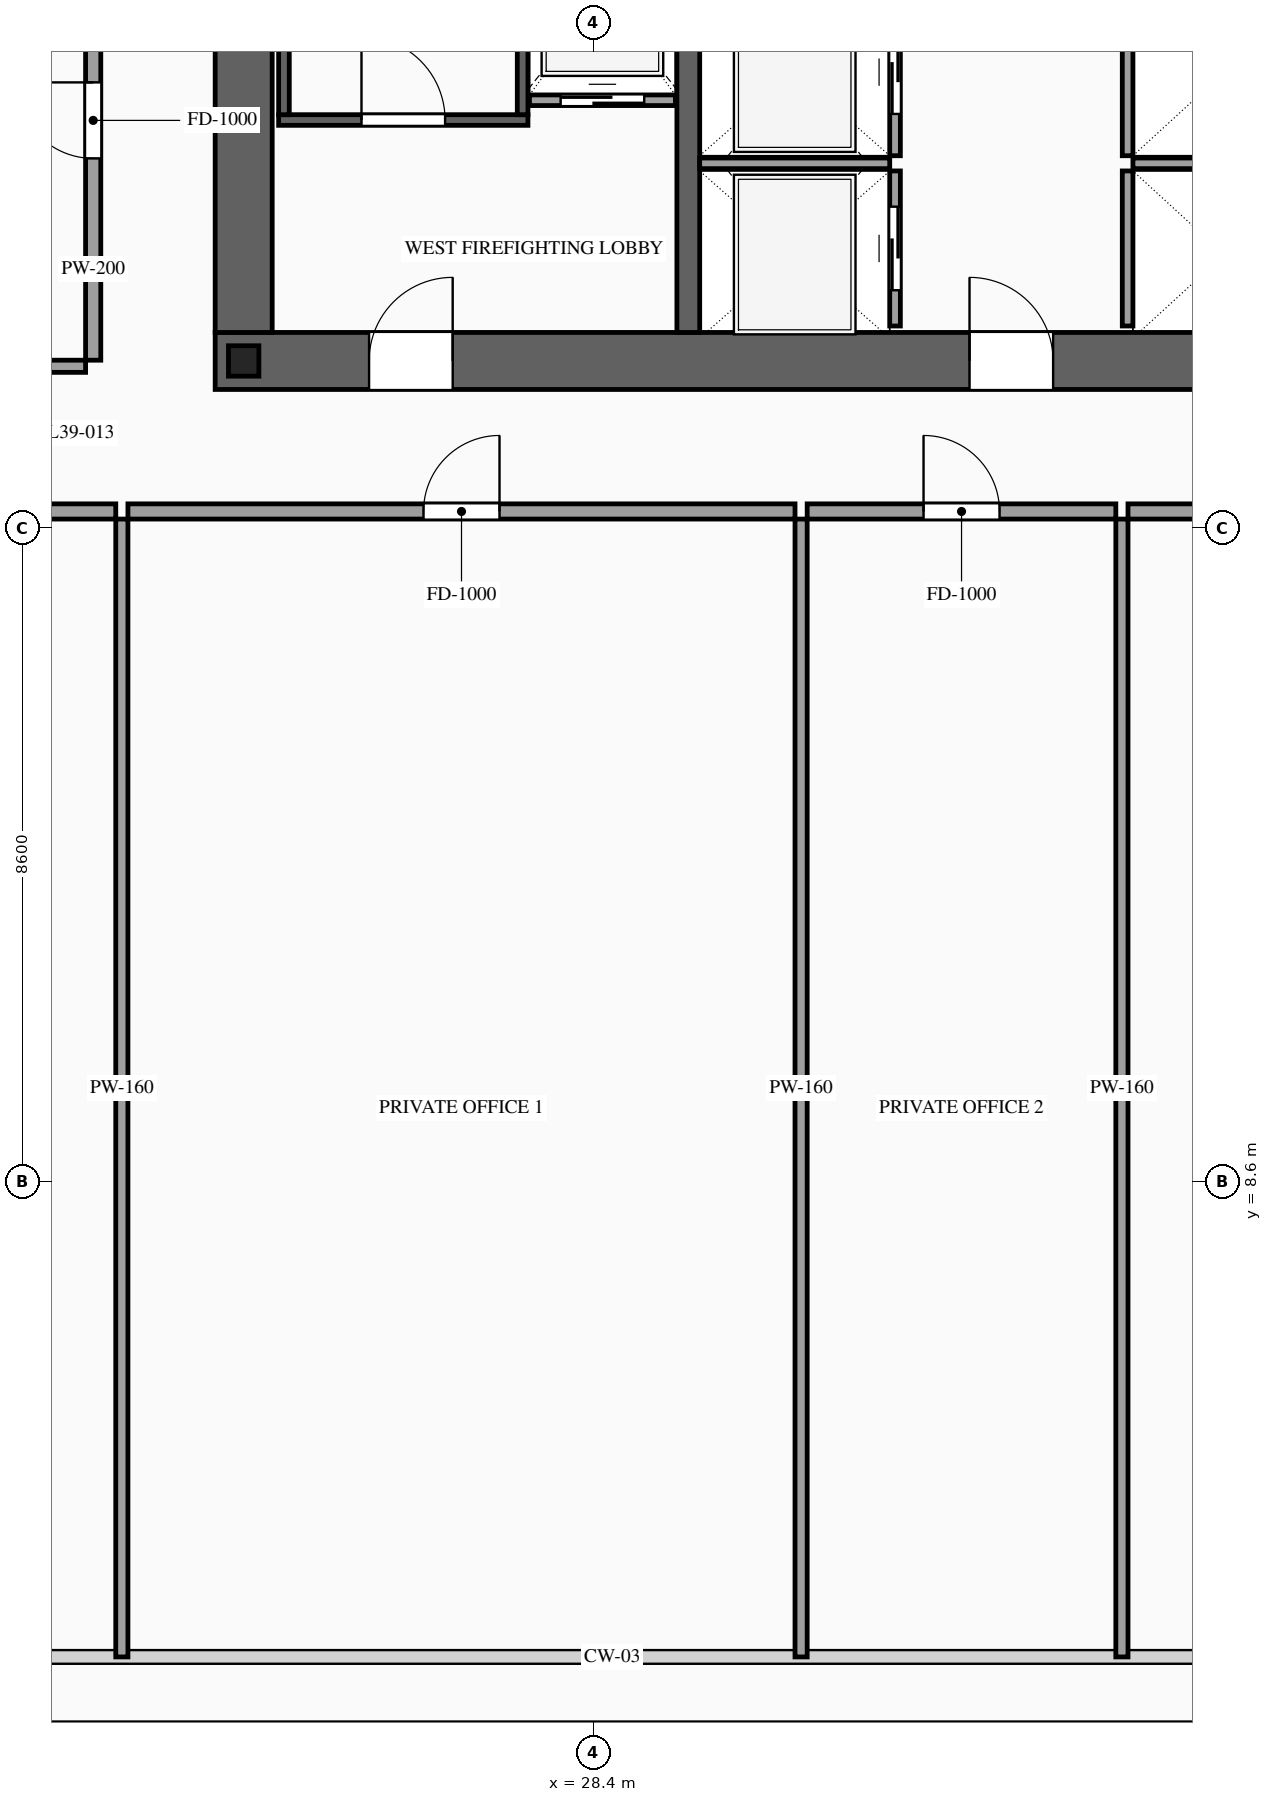
"""IFC4 building model, lengths in metres.
Left out: names, types, materials, properties, quantities, classifications, styles, units other than length and angle.
Written with IfcOpenShell. Run it as: python <this file> out.ifc"""

import sys

from ifc_helpers import new_model, si_unit, direction, frame, frame_2d, origin, origin_2d, place, context, subcontext, project, spatial, rectangle, i_section, extrude, source, transform, mapped, element, fill, save


model = new_model("IFC4")
c1 = context("Model", 3, precision=1e-05, world=origin(), true_north=direction((0.0, 1.0)))
c2 = subcontext(c1, "Body", "Model", "MODEL_VIEW")
j1 = project(units=[si_unit("LENGTHUNIT", "METRE"), si_unit("PLANEANGLEUNIT", "RADIAN")], contexts=[c1])
p1 = place(None, origin())
s1 = spatial("IfcSite", under=j1, at=p1, CompositionType="ELEMENT")
p2 = place(p1, origin())
s2 = spatial("IfcBuilding", under=s1, at=p2, CompositionType="ELEMENT")
p3 = place(p2, frame((0.0, 0.0, 148.8)))
s3 = spatial("IfcBuildingStorey", under=s2, at=p3, CompositionType="ELEMENT", Elevation=148.8)
p4 = place(p3, frame((23.425, 19.4, 0.0), z_axis=(0.0, 0.0, 1.0), x_axis=(1.0, 0.0, 0.0)))
e1 = element("IfcWall", 1, at=p4, inside=s3, PredefinedType="SHEAR", context=c2, shape_type="SweptSolid", body=[
    extrude(rectangle(XDim=27.15, YDim=0.75, at=frame_2d((13.575, 0.0))), origin(), (0.0, 0.0, 1.0), 3.6),
])
p5 = place(p4, frame((2.025, 0.0, 0.0)))
e2 = element("IfcOpeningElement", 2, at=p5, cuts=e1, PredefinedType="OPENING", context=c2, shape_type="SweptSolid", body=[
    extrude(rectangle(XDim=1.1, YDim=2.2, at=frame_2d((0.55, 1.1))), frame((0.0, 0.39, 0.0), z_axis=(0.0, -1.0, 0.0), x_axis=(1.0, 0.0, 0.0)), (0.0, 0.0, 1.0), 0.78),
])
p6 = place(p4, frame((9.925, 0.0, 0.0)))
e3 = element("IfcOpeningElement", 3, at=p6, cuts=e1, PredefinedType="OPENING", context=c2, shape_type="SweptSolid", body=[
    extrude(rectangle(XDim=1.1, YDim=2.2, at=frame_2d((0.55, 1.1))), frame((0.0, 0.39, 0.0), z_axis=(0.0, -1.0, 0.0), x_axis=(1.0, 0.0, 0.0)), (0.0, 0.0, 1.0), 0.78),
])
p7 = place(p4, frame((23.125, 0.0, 0.0)))
e4 = element("IfcOpeningElement", 4, at=p7, cuts=e1, PredefinedType="OPENING", context=c2, shape_type="SweptSolid", body=[
    extrude(rectangle(XDim=1.1, YDim=2.2, at=frame_2d((0.55, 1.1))), frame((0.0, 0.39, 0.0), z_axis=(0.0, -1.0, 0.0), x_axis=(1.0, 0.0, 0.0)), (0.0, 0.0, 1.0), 0.78),
])
p8 = place(p4, frame((19.745, 0.0, 0.0)))
e5 = element("IfcOpeningElement", 5, at=p8, cuts=e1, PredefinedType="OPENING", context=c2, shape_type="SweptSolid", body=[
    extrude(rectangle(XDim=0.9, YDim=2.15, at=frame_2d((0.45, 1.075))), frame((0.0, 0.39, 0.0), z_axis=(0.0, -1.0, 0.0), x_axis=(1.0, 0.0, 0.0)), (0.0, 0.0, 1.0), 0.78),
])
p9 = place(p4, frame((18.305, 0.0, 0.0)))
e6 = element("IfcOpeningElement", 6, at=p9, cuts=e1, PredefinedType="OPENING", context=c2, shape_type="SweptSolid", body=[
    extrude(rectangle(XDim=0.9, YDim=2.15, at=frame_2d((0.45, 1.075))), frame((0.0, 0.39, 0.0), z_axis=(0.0, -1.0, 0.0), x_axis=(1.0, 0.0, 0.0)), (0.0, 0.0, 1.0), 0.78),
])
m1 = source(origin(), c2, "Body", "SweptSolid", [
    extrude(rectangle(XDim=12.05, YDim=0.75, at=frame_2d((6.025, 0.0))), origin(), (0.0, 0.0, 1.0), 3.6),
])
p10 = place(p3, frame((23.8, 19.775, 0.0), z_axis=(0.0, 0.0, 1.0), x_axis=(0.0, 1.0, 0.0)))
e7 = element("IfcWall", 7, at=p10, inside=s3, PredefinedType="SHEAR", context=c2, shape_type="MappedRepresentation", body=[
    mapped(m1, transform((0.0, 0.0, 0.0), scale=1.0)),
])
m2 = source(origin(), c2, "Body", "SweptSolid", [
    extrude(rectangle(XDim=12.05, YDim=0.3, at=frame_2d((6.025, 0.0))), origin(), (0.0, 0.0, 1.0), 3.6),
])
p11 = place(p3, frame((29.65, 19.775, 0.0), z_axis=(0.0, 0.0, 1.0), x_axis=(0.0, 1.0, 0.0)))
e8 = element("IfcWall", 8, at=p11, inside=s3, PredefinedType="SOLIDWALL", context=c2, shape_type="MappedRepresentation", body=[
    mapped(m2, transform((0.0, 0.0, 0.0), scale=1.0)),
])
m3 = source(origin(), c2, "Body", "SweptSolid", [
    extrude(i_section(OverallWidth=0.4, OverallDepth=0.4, WebThickness=0.013, FlangeThickness=0.021, at=origin_2d()), origin(), (0.0, 0.0, 1.0), 3.6),
])
p12 = place(p3, frame((23.8, 19.4, 0.0), z_axis=(0.0, 0.0, 1.0), x_axis=(1.0, 0.0, 0.0)))
e9 = element("IfcColumn", 9, at=p12, inside=s3, PredefinedType="COLUMN", context=c2, shape_type="MappedRepresentation", body=[
    mapped(m3, transform((0.0, 0.0, 0.0), scale=1.0)),
])
p13 = place(p3, frame((27.56, 22.83, 0.0), z_axis=(0.0, 0.0, 1.0), x_axis=(1.0, 0.0, 0.0)))
e10 = element("IfcWall", 10, at=p13, inside=s3, PredefinedType="SOLIDWALL", context=c2, shape_type="SweptSolid", body=[
    extrude(rectangle(XDim=1.92, YDim=0.14, at=frame_2d((0.96, 0.0))), origin(), (0.0, 0.0, 1.0), 3.38),
])
p14 = place(p13, frame((0.41, 0.0, 0.0)))
e11 = element("IfcOpeningElement", 11, at=p14, cuts=e10, PredefinedType="OPENING", context=c2, shape_type="SweptSolid", body=[
    extrude(rectangle(XDim=1.1, YDim=2.2, at=frame_2d((0.55, 1.1))), frame((0.0, 0.085, 0.0), z_axis=(0.0, -1.0, 0.0), x_axis=(1.0, 0.0, 0.0)), (0.0, 0.0, 1.0), 0.17),
])
p15 = place(p3, frame((32.37, 19.86, 0.0), z_axis=(0.0, 0.0, 1.0), x_axis=(0.0, 1.0, 0.0)))
e12 = element("IfcWall", 12, at=p15, inside=s3, PredefinedType="SOLIDWALL", context=c2, shape_type="SweptSolid", body=[
    extrude(rectangle(XDim=2.04, YDim=0.14, at=frame_2d((1.02, 0.0))), origin(), (0.0, 0.0, 1.0), 3.38),
])
p16 = place(p15, frame((0.47, 0.0, 0.0)))
e13 = element("IfcOpeningElement", 13, at=p16, cuts=e12, PredefinedType="OPENING", context=c2, shape_type="SweptSolid", body=[
    extrude(rectangle(XDim=1.1, YDim=2.2, at=frame_2d((0.55, 1.1))), frame((0.0, 0.085, 0.0), z_axis=(0.0, -1.0, 0.0), x_axis=(1.0, 0.0, 0.0)), (0.0, 0.0, 1.0), 0.17),
])
m4 = source(origin(), c2, "Body", "SweptSolid", [
    extrude(rectangle(XDim=2.5, YDim=0.14, at=frame_2d((1.25, 0.0))), origin(), (0.0, 0.0, 1.0), 3.38),
])
p17 = place(p3, frame((29.8, 22.0, 0.0), z_axis=(0.0, 0.0, 1.0), x_axis=(1.0, 0.0, 0.0)))
e14 = element("IfcWall", 14, at=p17, inside=s3, PredefinedType="SOLIDWALL", context=c2, shape_type="MappedRepresentation", body=[
    mapped(m4, transform((0.0, 0.0, 0.0), scale=1.0)),
])
p18 = place(p3, frame((32.37, 22.1, 0.0), z_axis=(0.0, 0.0, 1.0), x_axis=(0.0, 1.0, 0.0)))
e15 = element("IfcWall", 15, at=p18, inside=s3, PredefinedType="SOLIDWALL", context=c2, shape_type="SweptSolid", body=[
    extrude(rectangle(XDim=2.2, YDim=0.14, at=frame_2d((1.1, 0.0))), origin(), (0.0, 0.0, 1.0), 3.38),
])
p19 = place(p18, frame((0.55, 0.0, 0.0)))
e16 = element("IfcOpeningElement", 16, at=p19, cuts=e15, PredefinedType="OPENING", context=c2, shape_type="SweptSolid", body=[
    extrude(rectangle(XDim=1.1, YDim=2.2, at=frame_2d((0.55, 1.1))), frame((0.0, 0.085, 0.0), z_axis=(0.0, -1.0, 0.0), x_axis=(1.0, 0.0, 0.0)), (0.0, 0.0, 1.0), 0.17),
])
m5 = source(origin(), c2, "Body", "SweptSolid", [
    extrude(rectangle(XDim=2.04, YDim=0.14, at=frame_2d((1.02, 0.0))), origin(), (0.0, 0.0, 1.0), 3.38),
])
p20 = place(p3, frame((35.43, 19.86, 0.0), z_axis=(0.0, 0.0, 1.0), x_axis=(0.0, 1.0, 0.0)))
e17 = element("IfcWall", 17, at=p20, inside=s3, PredefinedType="SOLIDWALL", context=c2, shape_type="MappedRepresentation", body=[
    mapped(m5, transform((0.0, 0.0, 0.0), scale=1.0)),
])
m6 = source(origin(), c2, "Body", "SweptSolid", [
    extrude(rectangle(XDim=2.4, YDim=0.14, at=frame_2d((1.2, 0.0))), origin(), (0.0, 0.0, 1.0), 3.38),
])
p21 = place(p3, frame((35.5, 22.0, 0.0), z_axis=(0.0, 0.0, 1.0), x_axis=(1.0, 0.0, 0.0)))
e18 = element("IfcWall", 18, at=p21, inside=s3, PredefinedType="SOLIDWALL", context=c2, shape_type="MappedRepresentation", body=[
    mapped(m6, transform((0.0, 0.0, 0.0), scale=1.0)),
])
m7 = source(origin(), c2, "Body", "SweptSolid", [
    extrude(rectangle(XDim=2.2, YDim=0.14, at=frame_2d((1.1, 0.0))), origin(), (0.0, 0.0, 1.0), 3.38),
])
p22 = place(p3, frame((35.43, 22.1, 0.0), z_axis=(0.0, 0.0, 1.0), x_axis=(0.0, 1.0, 0.0)))
e19 = element("IfcWall", 19, at=p22, inside=s3, PredefinedType="SOLIDWALL", context=c2, shape_type="MappedRepresentation", body=[
    mapped(m7, transform((0.0, 0.0, 0.0), scale=1.0)),
])
p23 = place(p3, frame((24.26, 22.57, 0.0), z_axis=(0.0, 0.0, 1.0), x_axis=(1.0, 0.0, 0.0)))
e20 = element("IfcWall", 20, at=p23, inside=s3, PredefinedType="SOLIDWALL", context=c2, shape_type="SweptSolid", body=[
    extrude(rectangle(XDim=3.28, YDim=0.14, at=frame_2d((1.64, 0.0))), origin(), (0.0, 0.0, 1.0), 3.38),
])
p24 = place(p23, frame((1.09, 0.0, 0.0)))
e21 = element("IfcOpeningElement", 21, at=p24, cuts=e20, PredefinedType="OPENING", context=c2, shape_type="SweptSolid", body=[
    extrude(rectangle(XDim=1.1, YDim=2.2, at=frame_2d((0.55, 1.1))), frame((0.0, 0.085, 0.0), z_axis=(0.0, -1.0, 0.0), x_axis=(1.0, 0.0, 0.0)), (0.0, 0.0, 1.0), 0.17),
])
m8 = source(origin(), c2, "Body", "SweptSolid", [
    extrude(rectangle(XDim=8.94, YDim=0.14, at=frame_2d((4.47, 0.0))), origin(), (0.0, 0.0, 1.0), 3.38),
])
for number, where, z_axis, x_axis in (
    (22, (24.33, 22.64, 0.0), (0.0, 0.0, 1.0), (0.0, 1.0, 0.0)),
    (23, (27.47, 22.64, 0.0), (0.0, 0.0, 1.0), (0.0, 1.0, 0.0)),
):
    element("IfcWall", number, at=place(p3, frame(where, z_axis=z_axis, x_axis=x_axis)), inside=s3, PredefinedType="SOLIDWALL", context=c2, shape_type="MappedRepresentation", body=[
        mapped(m8, transform((0.0, 0.0, 0.0), scale=1.0)),
    ])
p25 = place(p3, frame((16.44, 17.42, 0.0), z_axis=(0.0, 0.0, 1.0), x_axis=(1.0, 0.0, 0.0)))
e24 = element("IfcWall", 24, at=p25, inside=s3, PredefinedType="PARTITIONING", context=c2, shape_type="SweptSolid", body=[
    extrude(rectangle(XDim=5.677, YDim=0.2, at=frame_2d((2.838, 0.0))), origin(), (0.0, 0.0, 1.0), 3.38),
])
p26 = place(p25, frame((3.543, 0.0, 0.0)))
e25 = element("IfcOpeningElement", 25, at=p26, cuts=e24, PredefinedType="OPENING", context=c2, shape_type="SweptSolid", body=[
    extrude(rectangle(XDim=1.0, YDim=2.2, at=frame_2d((0.5, 1.1))), frame((0.0, 0.115, 0.0), z_axis=(0.0, -1.0, 0.0), x_axis=(1.0, 0.0, 0.0)), (0.0, 0.0, 1.0), 0.23),
])
m9 = source(origin(), c2, "Body", "SweptSolid", [
    extrude(rectangle(XDim=14.97, YDim=0.16, at=frame_2d((7.485, 0.0))), origin(), (0.0, 0.0, 1.0), 3.38),
])
p27 = place(p3, frame((22.197, 2.35, 0.0), z_axis=(0.0, 0.0, 1.0), x_axis=(0.0, 1.0, 0.0)))
e26 = element("IfcWall", 26, at=p27, inside=s3, PredefinedType="PARTITIONING", context=c2, shape_type="MappedRepresentation", body=[
    mapped(m9, transform((0.0, 0.0, 0.0), scale=1.0)),
])
p28 = place(p3, frame((22.277, 17.42, 0.0), z_axis=(0.0, 0.0, 1.0), x_axis=(1.0, 0.0, 0.0)))
e27 = element("IfcWall", 27, at=p28, inside=s3, PredefinedType="PARTITIONING", context=c2, shape_type="SweptSolid", body=[
    extrude(rectangle(XDim=8.777, YDim=0.2, at=frame_2d((4.388, 0.0))), origin(), (0.0, 0.0, 1.0), 3.38),
])
p29 = place(p28, frame((3.889, 0.0, 0.0)))
e28 = element("IfcOpeningElement", 28, at=p29, cuts=e27, PredefinedType="OPENING", context=c2, shape_type="SweptSolid", body=[
    extrude(rectangle(XDim=1.0, YDim=2.2, at=frame_2d((0.5, 1.1))), frame((0.0, 0.115, 0.0), z_axis=(0.0, -1.0, 0.0), x_axis=(1.0, 0.0, 0.0)), (0.0, 0.0, 1.0), 0.23),
])
p30 = place(p3, frame((31.134, 2.35, 0.0), z_axis=(0.0, 0.0, 1.0), x_axis=(0.0, 1.0, 0.0)))
e29 = element("IfcWall", 29, at=p30, inside=s3, PredefinedType="PARTITIONING", context=c2, shape_type="MappedRepresentation", body=[
    mapped(m9, transform((0.0, 0.0, 0.0), scale=1.0)),
])
p31 = place(p3, frame((31.214, 17.42, 0.0), z_axis=(0.0, 0.0, 1.0), x_axis=(1.0, 0.0, 0.0)))
e30 = element("IfcWall", 30, at=p31, inside=s3, PredefinedType="PARTITIONING", context=c2, shape_type="SweptSolid", body=[
    extrude(rectangle(XDim=4.061, YDim=0.2, at=frame_2d((2.03, 0.0))), origin(), (0.0, 0.0, 1.0), 3.38),
])
p32 = place(p31, frame((1.531, 0.0, 0.0)))
e31 = element("IfcOpeningElement", 31, at=p32, cuts=e30, PredefinedType="OPENING", context=c2, shape_type="SweptSolid", body=[
    extrude(rectangle(XDim=1.0, YDim=2.2, at=frame_2d((0.5, 1.1))), frame((0.0, 0.115, 0.0), z_axis=(0.0, -1.0, 0.0), x_axis=(1.0, 0.0, 0.0)), (0.0, 0.0, 1.0), 0.23),
])
p33 = place(p3, frame((35.355, 2.35, 0.0), z_axis=(0.0, 0.0, 1.0), x_axis=(0.0, 1.0, 0.0)))
e32 = element("IfcWall", 32, at=p33, inside=s3, PredefinedType="PARTITIONING", context=c2, shape_type="MappedRepresentation", body=[
    mapped(m9, transform((0.0, 0.0, 0.0), scale=1.0)),
])
p34 = place(p3, frame((35.435, 17.42, 0.0), z_axis=(0.0, 0.0, 1.0), x_axis=(1.0, 0.0, 0.0)))
e33 = element("IfcWall", 33, at=p34, inside=s3, PredefinedType="PARTITIONING", context=c2, shape_type="SweptSolid", body=[
    extrude(rectangle(XDim=9.325, YDim=0.2, at=frame_2d((4.663, 0.0))), origin(), (0.0, 0.0, 1.0), 3.38),
])
p35 = place(p34, frame((4.162, 0.0, 0.0)))
e34 = element("IfcOpeningElement", 34, at=p35, cuts=e33, PredefinedType="OPENING", context=c2, shape_type="SweptSolid", body=[
    extrude(rectangle(XDim=1.0, YDim=2.2, at=frame_2d((0.5, 1.1))), frame((0.0, 0.115, 0.0), z_axis=(0.0, -1.0, 0.0), x_axis=(1.0, 0.0, 0.0)), (0.0, 0.0, 1.0), 0.23),
])
p36 = place(p3, frame((21.82, 19.41, 0.0), z_axis=(0.0, 0.0, 1.0), x_axis=(0.0, 1.0, 0.0)))
e35 = element("IfcWall", 35, at=p36, inside=s3, PredefinedType="PARTITIONING", context=c2, shape_type="SweptSolid", body=[
    extrude(rectangle(XDim=6.31, YDim=0.2, at=frame_2d((3.155, 0.0))), origin(), (0.0, 0.0, 1.0), 3.38),
])
p37 = place(p36, frame((2.655, 0.0, 0.0)))
e36 = element("IfcOpeningElement", 36, at=p37, cuts=e35, PredefinedType="OPENING", context=c2, shape_type="SweptSolid", body=[
    extrude(rectangle(XDim=1.0, YDim=2.2, at=frame_2d((0.5, 1.1))), frame((0.0, 0.115, 0.0), z_axis=(0.0, -1.0, 0.0), x_axis=(1.0, 0.0, 0.0)), (0.0, 0.0, 1.0), 0.23),
])
m10 = source(origin(), c2, "Body", "SweptSolid", [
    extrude(rectangle(XDim=8.17, YDim=0.16, at=frame_2d((4.085, 0.0))), origin(), (0.0, 0.0, 1.0), 2.875),
])
p38 = place(p3, frame((13.55, 19.33, 0.0), z_axis=(0.0, 0.0, 1.0), x_axis=(1.0, 0.0, 0.0)))
e37 = element("IfcWall", 37, at=p38, inside=s3, PredefinedType="PARTITIONING", context=c2, shape_type="MappedRepresentation", body=[
    mapped(m10, transform((0.0, 0.0, 0.0), scale=1.0)),
])
m11 = source(origin(), c2, "Body", "SweptSolid", [
    extrude(rectangle(XDim=1.1, YDim=2.2, at=frame_2d((0.55, 1.1))), frame((0.0, 0.025, 0.0), z_axis=(0.0, -1.0, 0.0), x_axis=(1.0, 0.0, 0.0)), (0.0, 0.0, 1.0), 0.05),
])
p39 = place(p14, origin())
e38 = element("IfcDoor", 38, at=p39, inside=s3, OperationType="SLIDING_TO_LEFT", PredefinedType="DOOR", context=c2, shape_type="MappedRepresentation", body=[
    mapped(m11, transform((0.0, 0.0, 0.0), scale=1.0)),
])
fill(e11, e38)
p40 = place(p16, origin())
e39 = element("IfcDoor", 39, at=p40, inside=s3, OperationType="SLIDING_TO_LEFT", PredefinedType="DOOR", context=c2, shape_type="MappedRepresentation", body=[
    mapped(m11, transform((0.0, 0.0, 0.0), scale=1.0)),
])
fill(e13, e39)
p41 = place(p19, origin())
e40 = element("IfcDoor", 40, at=p41, inside=s3, OperationType="SLIDING_TO_RIGHT", PredefinedType="DOOR", context=c2, shape_type="MappedRepresentation", body=[
    mapped(m11, transform((0.0, 0.0, 0.0), scale=1.0)),
])
fill(e16, e40)
m12 = source(origin(), c2, "Body", "SweptSolid", [
    extrude(rectangle(XDim=1.1, YDim=2.2, at=frame_2d((0.55, 1.1))), frame((0.0, 0.025, 0.0), z_axis=(0.0, -1.0, 0.0), x_axis=(1.0, 0.0, 0.0)), (0.0, 0.0, 1.0), 0.05),
])
p42 = place(p24, origin())
e41 = element("IfcDoor", 41, at=p42, inside=s3, OperationType="SINGLE_SWING_LEFT", PredefinedType="DOOR", context=c2, shape_type="MappedRepresentation", body=[
    mapped(m12, transform((0.0, 0.0, 0.0), scale=1.0)),
])
fill(e21, e41)
p43 = place(p5, origin())
e42 = element("IfcDoor", 42, at=p43, inside=s3, OperationType="SINGLE_SWING_RIGHT", PredefinedType="DOOR", context=c2, shape_type="MappedRepresentation", body=[
    mapped(m12, transform((0.0, 0.0, 0.0), scale=1.0)),
])
fill(e2, e42)
p44 = place(p6, origin())
e43 = element("IfcDoor", 43, at=p44, inside=s3, OperationType="SINGLE_SWING_LEFT", PredefinedType="DOOR", context=c2, shape_type="MappedRepresentation", body=[
    mapped(m12, transform((0.0, 0.0, 0.0), scale=1.0)),
])
fill(e3, e43)
m13 = source(origin(), c2, "Body", "SweptSolid", [
    extrude(rectangle(XDim=1.0, YDim=2.2, at=frame_2d((0.5, 1.1))), frame((0.0, 0.025, 0.0), z_axis=(0.0, -1.0, 0.0), x_axis=(1.0, 0.0, 0.0)), (0.0, 0.0, 1.0), 0.05),
])
p45 = place(p29, origin())
e44 = element("IfcDoor", 44, at=p45, inside=s3, OperationType="SINGLE_SWING_RIGHT", PredefinedType="DOOR", context=c2, shape_type="MappedRepresentation", body=[
    mapped(m13, transform((0.0, 0.0, 0.0), scale=1.0)),
])
fill(e28, e44)
p46 = place(p32, origin())
e45 = element("IfcDoor", 45, at=p46, inside=s3, OperationType="SINGLE_SWING_LEFT", PredefinedType="DOOR", context=c2, shape_type="MappedRepresentation", body=[
    mapped(m13, transform((0.0, 0.0, 0.0), scale=1.0)),
])
fill(e31, e45)
p47 = place(p37, origin())
e46 = element("IfcDoor", 46, at=p47, inside=s3, OperationType="SINGLE_SWING_RIGHT", PredefinedType="DOOR", context=c2, shape_type="MappedRepresentation", body=[
    mapped(m13, transform((0.0, 0.0, 0.0), scale=1.0)),
])
fill(e36, e46)
save(model, sys.argv[1])
